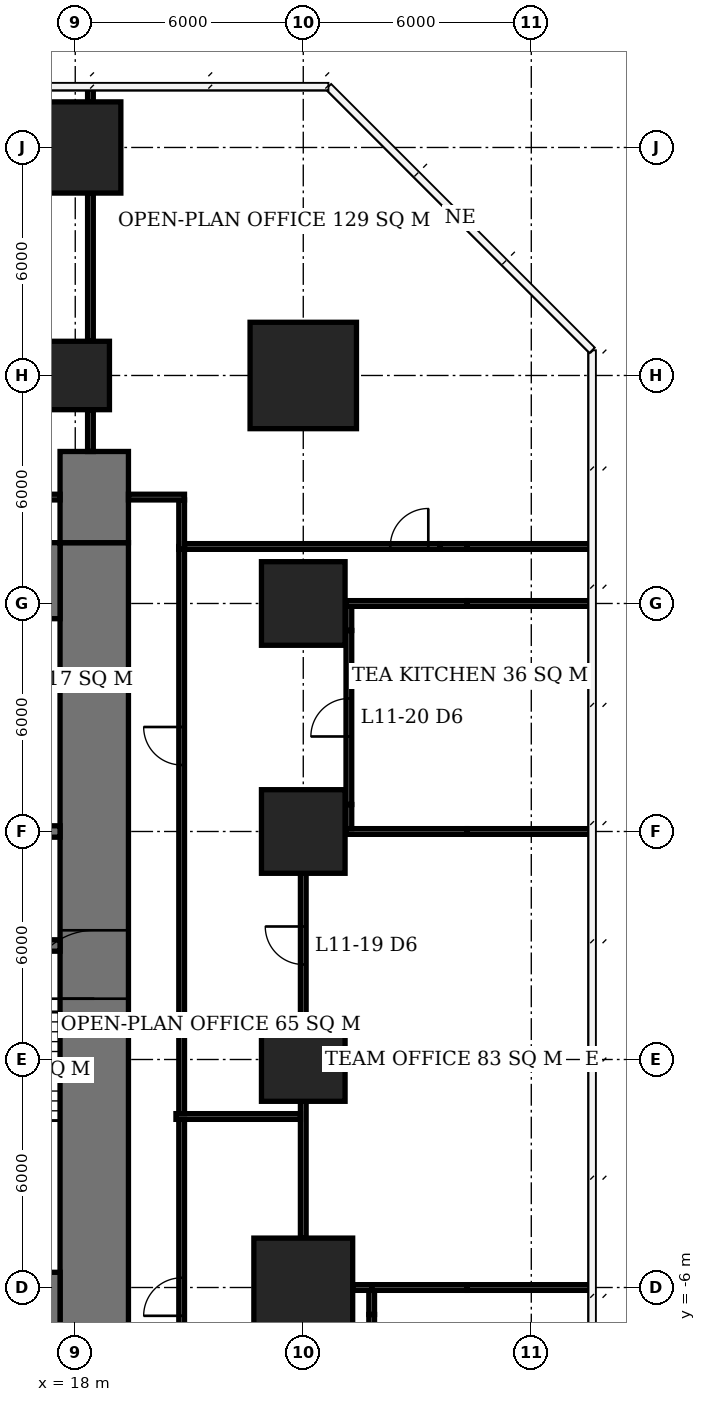
"""IFC4 building model, lengths in metres.
Left out: names, types, materials, properties, quantities, classifications, styles, units other than length and angle.
Written with IfcOpenShell. Run it as: python <this file> out.ifc"""

import sys

from ifc_helpers import new_model, si_unit, direction, frame, frame_2d, origin, origin_2d, place, context, subcontext, project, spatial, rectangle, extrude, element, fill, save


model = new_model("IFC4")
c1 = context("Model", 3, precision=1e-05, world=origin(), true_north=direction((0.0, 1.0)))
c2 = subcontext(c1, "Body", "Model", "MODEL_VIEW")
j1 = project(units=[si_unit("LENGTHUNIT", "METRE"), si_unit("PLANEANGLEUNIT", "RADIAN")], contexts=[c1])
p1 = place(None, origin())
s1 = spatial("IfcSite", under=j1, at=p1, CompositionType="ELEMENT")
p2 = place(p1, origin())
s2 = spatial("IfcBuilding", under=s1, at=p2, CompositionType="ELEMENT")
p3 = place(p2, frame((0.0, 0.0, 49.4)))
s3 = spatial("IfcBuildingStorey", under=s2, at=p3, CompositionType="ELEMENT", Elevation=49.4)
p4 = place(p3, frame((18.0, 18.0, 0.0), z_axis=(0.0, 0.0, 1.0), x_axis=(1.0, 0.0, 0.0)))
e1 = element("IfcColumn", 1, at=p4, inside=s3, PredefinedType="COLUMN", context=c2, shape_type="SweptSolid", body=[
    extrude(rectangle(XDim=1.8, YDim=1.8, at=origin_2d()), origin(), (0.0, 0.0, 1.0), 3.9),
])
p5 = place(p3, frame((18.0, 24.0, 0.0), z_axis=(0.0, 0.0, 1.0), x_axis=(1.0, 0.0, 0.0)))
e2 = element("IfcColumn", 2, at=p5, inside=s3, PredefinedType="COLUMN", context=c2, shape_type="SweptSolid", body=[
    extrude(rectangle(XDim=2.4, YDim=2.4, at=origin_2d()), origin(), (0.0, 0.0, 1.0), 3.9),
])
p6 = place(p3, frame((24.0, -6.0, 0.0), z_axis=(0.0, 0.0, 1.0), x_axis=(1.0, 0.0, 0.0)))
e3 = element("IfcColumn", 3, at=p6, inside=s3, PredefinedType="COLUMN", context=c2, shape_type="SweptSolid", body=[
    extrude(rectangle(XDim=2.6, YDim=2.6, at=origin_2d()), origin(), (0.0, 0.0, 1.0), 3.9),
])
for number, where, z_axis, x_axis in (
    (4, (24.0, 0.0, 0.0), (0.0, 0.0, 1.0), (1.0, 0.0, 0.0)),
    (5, (24.0, 6.0, 0.0), (0.0, 0.0, 1.0), (1.0, 0.0, 0.0)),
    (6, (24.0, 12.0, 0.0), (0.0, 0.0, 1.0), (1.0, 0.0, 0.0)),
):
    element("IfcColumn", number, at=place(p3, frame(where, z_axis=z_axis, x_axis=x_axis)), inside=s3, PredefinedType="COLUMN", context=c2, shape_type="SweptSolid", body=[
        extrude(rectangle(XDim=2.2, YDim=2.2, at=origin_2d()), origin(), (0.0, 0.0, 1.0), 3.9),
    ])
p7 = place(p3, frame((24.0, 18.0, 0.0), z_axis=(0.0, 0.0, 1.0), x_axis=(1.0, 0.0, 0.0)))
e7 = element("IfcColumn", 7, at=p7, inside=s3, PredefinedType="COLUMN", context=c2, shape_type="SweptSolid", body=[
    extrude(rectangle(XDim=2.8, YDim=2.8, at=origin_2d()), origin(), (0.0, 0.0, 1.0), 3.9),
])
for number, where, z_axis, x_axis in (
    (8, (-5.6, -6.6, 0.0), (0.0, 0.0, 1.0), (1.0, 0.0, 0.0)),
    (9, (-5.6, 12.6, 0.0), (0.0, 0.0, 1.0), (1.0, 0.0, 0.0)),
):
    element("IfcWall", number, at=place(p3, frame(where, z_axis=z_axis, x_axis=x_axis)), inside=s3, PredefinedType="SHEAR", context=c2, shape_type="SweptSolid", body=[
        extrude(rectangle(XDim=23.2, YDim=2.0, at=frame_2d((11.6, 0.0))), origin(), (0.0, 0.0, 1.0), 3.9),
    ])
p8 = place(p3, frame((18.5, -7.6, 0.0), z_axis=(0.0, 0.0, 1.0), x_axis=(0.0, 1.0, 0.0)))
e10 = element("IfcWall", 10, at=p8, inside=s3, PredefinedType="SHEAR", context=c2, shape_type="SweptSolid", body=[
    extrude(rectangle(XDim=21.2, YDim=1.8, at=frame_2d((10.6, 0.0))), origin(), (0.0, 0.0, 1.0), 3.9),
])
p9 = place(p8, frame((9.2, 0.0, 0.0)))
e11 = element("IfcOpeningElement", 11, at=p9, cuts=e10, PredefinedType="OPENING", context=c2, shape_type="SweptSolid", body=[
    extrude(rectangle(XDim=1.8, YDim=2.4, at=frame_2d((0.9, 1.2))), frame((0.0, 0.91, 0.0), z_axis=(0.0, -1.0, 0.0), x_axis=(1.0, 0.0, 0.0)), (0.0, 0.0, 1.0), 1.82),
])
p10 = place(p3, frame((18.5, 13.6, 0.0), z_axis=(0.0, 0.0, 1.0), x_axis=(0.0, 1.0, 0.0)))
e12 = element("IfcWall", 12, at=p10, inside=s3, PredefinedType="SHEAR", context=c2, shape_type="SweptSolid", body=[
    extrude(rectangle(XDim=2.4, YDim=1.8, at=frame_2d((1.2, 0.0))), origin(), (0.0, 0.0, 1.0), 3.9),
])
p11 = place(p3, frame((12.15, 3.0, 0.0), z_axis=(0.0, 0.0, 1.0), x_axis=(1.0, 0.0, 0.0)))
e13 = element("IfcWall", 13, at=p11, inside=s3, PredefinedType="SHEAR", context=c2, shape_type="SweptSolid", body=[
    extrude(rectangle(XDim=5.45, YDim=0.3, at=frame_2d((2.725, 0.0))), origin(), (0.0, 0.0, 1.0), 3.9),
])
p12 = place(p11, frame((3.25, 0.0, 0.0)))
e14 = element("IfcOpeningElement", 14, at=p12, cuts=e13, PredefinedType="OPENING", context=c2, shape_type="SweptSolid", body=[
    extrude(rectangle(XDim=1.2, YDim=2.1, at=frame_2d((0.6, 1.05))), frame((0.0, 0.16, 0.0), z_axis=(0.0, -1.0, 0.0), x_axis=(1.0, 0.0, 0.0)), (0.0, 0.0, 1.0), 0.32),
])
p13 = place(p11, frame((0.45, 0.0, 0.0)))
e15 = element("IfcOpeningElement", 15, at=p13, cuts=e13, PredefinedType="OPENING", context=c2, shape_type="SweptSolid", body=[
    extrude(rectangle(XDim=0.9, YDim=2.1, at=frame_2d((0.45, 1.05))), frame((0.0, 0.16, 0.0), z_axis=(0.0, -1.0, 0.0), x_axis=(1.0, 0.0, 0.0)), (0.0, 0.0, 1.0), 0.32),
])
p14 = place(p3, frame((-0.15, 6.0, 0.0), z_axis=(0.0, 0.0, 1.0), x_axis=(1.0, 0.0, 0.0)))
e16 = element("IfcWall", 16, at=p14, inside=s3, PredefinedType="SHEAR", context=c2, shape_type="SweptSolid", body=[
    extrude(rectangle(XDim=17.75, YDim=0.3, at=frame_2d((8.875, 0.0))), origin(), (0.0, 0.0, 1.0), 3.9),
])
p15 = place(p14, frame((13.15, 0.0, 0.0)))
e17 = element("IfcOpeningElement", 17, at=p15, cuts=e16, PredefinedType="OPENING", context=c2, shape_type="SweptSolid", body=[
    extrude(rectangle(XDim=0.9, YDim=2.1, at=frame_2d((0.45, 1.05))), frame((0.0, 0.16, 0.0), z_axis=(0.0, -1.0, 0.0), x_axis=(1.0, 0.0, 0.0)), (0.0, 0.0, 1.0), 0.32),
])
p16 = place(p14, frame((16.25, 0.0, 0.0)))
e18 = element("IfcOpeningElement", 18, at=p16, cuts=e16, PredefinedType="OPENING", context=c2, shape_type="SweptSolid", body=[
    extrude(rectangle(XDim=1.0, YDim=2.1, at=frame_2d((0.5, 1.05))), frame((0.0, 0.16, 0.0), z_axis=(0.0, -1.0, 0.0), x_axis=(1.0, 0.0, 0.0)), (0.0, 0.0, 1.0), 0.32),
])
p17 = place(p14, frame((1.1, 0.0, 0.0)))
e19 = element("IfcOpeningElement", 19, at=p17, cuts=e16, PredefinedType="OPENING", context=c2, shape_type="SweptSolid", body=[
    extrude(rectangle(XDim=1.1, YDim=2.1, at=frame_2d((0.55, 1.05))), frame((0.0, 0.16, 0.0), z_axis=(0.0, -1.0, 0.0), x_axis=(1.0, 0.0, 0.0)), (0.0, 0.0, 1.0), 0.32),
])
p18 = place(p14, frame((4.1, 0.0, 0.0)))
e20 = element("IfcOpeningElement", 20, at=p18, cuts=e16, PredefinedType="OPENING", context=c2, shape_type="SweptSolid", body=[
    extrude(rectangle(XDim=1.1, YDim=2.1, at=frame_2d((0.55, 1.05))), frame((0.0, 0.16, 0.0), z_axis=(0.0, -1.0, 0.0), x_axis=(1.0, 0.0, 0.0)), (0.0, 0.0, 1.0), 0.32),
])
p19 = place(p14, frame((7.1, 0.0, 0.0)))
e21 = element("IfcOpeningElement", 21, at=p19, cuts=e16, PredefinedType="OPENING", context=c2, shape_type="SweptSolid", body=[
    extrude(rectangle(XDim=1.1, YDim=2.1, at=frame_2d((0.55, 1.05))), frame((0.0, 0.16, 0.0), z_axis=(0.0, -1.0, 0.0), x_axis=(1.0, 0.0, 0.0)), (0.0, 0.0, 1.0), 0.32),
])
p20 = place(p14, frame((10.1, 0.0, 0.0)))
e22 = element("IfcOpeningElement", 22, at=p20, cuts=e16, PredefinedType="OPENING", context=c2, shape_type="SweptSolid", body=[
    extrude(rectangle(XDim=1.1, YDim=2.1, at=frame_2d((0.55, 1.05))), frame((0.0, 0.16, 0.0), z_axis=(0.0, -1.0, 0.0), x_axis=(1.0, 0.0, 0.0)), (0.0, 0.0, 1.0), 0.32),
])
p21 = place(p3, frame((25.3, -6.0, 0.0), z_axis=(0.0, 0.0, 1.0), x_axis=(1.0, 0.0, 0.0)))
e23 = element("IfcWall", 23, at=p21, inside=s3, PredefinedType="PARTITIONING", context=c2, shape_type="SweptSolid", body=[
    extrude(rectangle(XDim=0.575, YDim=0.15, at=frame_2d((0.288, 0.0))), origin(), (0.0, 0.0, 1.0), 2.65),
])
p22 = place(p3, frame((25.8, -6.0, 0.0), z_axis=(0.0, 0.0, 1.0), x_axis=(1.0, 0.0, 0.0)))
e24 = element("IfcWall", 24, at=p22, inside=s3, PredefinedType="PARTITIONING", context=c2, shape_type="SweptSolid", body=[
    extrude(rectangle(XDim=2.51, YDim=0.15, at=frame_2d((1.255, 0.0))), origin(), (0.0, 0.0, 1.0), 2.65),
])
p23 = place(p3, frame((28.31, -6.0, 0.0), z_axis=(0.0, 0.0, 1.0), x_axis=(1.0, 0.0, 0.0)))
e25 = element("IfcWall", 25, at=p23, inside=s3, PredefinedType="PARTITIONING", context=c2, shape_type="SweptSolid", body=[
    extrude(rectangle(XDim=3.29, YDim=0.15, at=frame_2d((1.645, 0.0))), origin(), (0.0, 0.0, 1.0), 3.65),
])
p24 = place(p3, frame((25.125, 6.0, 0.0), z_axis=(0.0, 0.0, 1.0), x_axis=(1.0, 0.0, 0.0)))
e26 = element("IfcWall", 26, at=p24, inside=s3, PredefinedType="PARTITIONING", context=c2, shape_type="SweptSolid", body=[
    extrude(rectangle(XDim=3.185, YDim=0.15, at=frame_2d((1.593, 0.0))), origin(), (0.0, 0.0, 1.0), 2.65),
])
p25 = place(p3, frame((28.31, 6.0, 0.0), z_axis=(0.0, 0.0, 1.0), x_axis=(1.0, 0.0, 0.0)))
e27 = element("IfcWall", 27, at=p25, inside=s3, PredefinedType="PARTITIONING", context=c2, shape_type="SweptSolid", body=[
    extrude(rectangle(XDim=3.29, YDim=0.15, at=frame_2d((1.645, 0.0))), origin(), (0.0, 0.0, 1.0), 3.65),
])
p26 = place(p3, frame((25.125, 12.0, 0.0), z_axis=(0.0, 0.0, 1.0), x_axis=(1.0, 0.0, 0.0)))
e28 = element("IfcWall", 28, at=p26, inside=s3, PredefinedType="PARTITIONING", context=c2, shape_type="SweptSolid", body=[
    extrude(rectangle(XDim=3.185, YDim=0.15, at=frame_2d((1.593, 0.0))), origin(), (0.0, 0.0, 1.0), 2.65),
])
p27 = place(p3, frame((28.31, 12.0, 0.0), z_axis=(0.0, 0.0, 1.0), x_axis=(1.0, 0.0, 0.0)))
e29 = element("IfcWall", 29, at=p27, inside=s3, PredefinedType="PARTITIONING", context=c2, shape_type="SweptSolid", body=[
    extrude(rectangle(XDim=3.29, YDim=0.15, at=frame_2d((1.645, 0.0))), origin(), (0.0, 0.0, 1.0), 3.65),
])
p28 = place(p3, frame((24.0, -4.7, 0.0), z_axis=(0.0, 0.0, 1.0), x_axis=(0.0, 1.0, 0.0)))
e30 = element("IfcWall", 30, at=p28, inside=s3, PredefinedType="PARTITIONING", context=c2, shape_type="SweptSolid", body=[
    extrude(rectangle(XDim=3.6, YDim=0.15, at=frame_2d((1.8, 0.0))), origin(), (0.0, 0.0, 1.0), 3.65),
])
p29 = place(p3, frame((24.0, 1.1, 0.0), z_axis=(0.0, 0.0, 1.0), x_axis=(0.0, 1.0, 0.0)))
e31 = element("IfcWall", 31, at=p29, inside=s3, PredefinedType="PARTITIONING", context=c2, shape_type="SweptSolid", body=[
    extrude(rectangle(XDim=3.8, YDim=0.15, at=frame_2d((1.9, 0.0))), origin(), (0.0, 0.0, 1.0), 3.65),
])
p30 = place(p29, frame((1.4, 0.0, 0.0)))
e32 = element("IfcOpeningElement", 32, at=p30, cuts=e31, PredefinedType="OPENING", context=c2, shape_type="SweptSolid", body=[
    extrude(rectangle(XDim=1.0, YDim=2.1, at=frame_2d((0.5, 1.05))), frame((0.0, 0.085, 0.0), z_axis=(0.0, -1.0, 0.0), x_axis=(1.0, 0.0, 0.0)), (0.0, 0.0, 1.0), 0.17),
])
p31 = place(p3, frame((25.2, 6.075, 0.0), z_axis=(0.0, 0.0, 1.0), x_axis=(0.0, 1.0, 0.0)))
e33 = element("IfcWall", 33, at=p31, inside=s3, PredefinedType="PARTITIONING", context=c2, shape_type="SweptSolid", body=[
    extrude(rectangle(XDim=0.635, YDim=0.15, at=frame_2d((0.317, 0.0))), origin(), (0.0, 0.0, 1.0), 2.65),
])
p32 = place(p3, frame((25.2, 6.71, 0.0), z_axis=(0.0, 0.0, 1.0), x_axis=(0.0, 1.0, 0.0)))
e34 = element("IfcWall", 34, at=p32, inside=s3, PredefinedType="PARTITIONING", context=c2, shape_type="SweptSolid", body=[
    extrude(rectangle(XDim=4.58, YDim=0.15, at=frame_2d((2.29, 0.0))), origin(), (0.0, 0.0, 1.0), 3.65),
])
p33 = place(p32, frame((1.79, 0.0, 0.0)))
e35 = element("IfcOpeningElement", 35, at=p33, cuts=e34, PredefinedType="OPENING", context=c2, shape_type="SweptSolid", body=[
    extrude(rectangle(XDim=1.0, YDim=2.1, at=frame_2d((0.5, 1.05))), frame((0.0, 0.085, 0.0), z_axis=(0.0, -1.0, 0.0), x_axis=(1.0, 0.0, 0.0)), (0.0, 0.0, 1.0), 0.17),
])
p34 = place(p3, frame((25.2, 11.29, 0.0), z_axis=(0.0, 0.0, 1.0), x_axis=(0.0, 1.0, 0.0)))
e36 = element("IfcWall", 36, at=p34, inside=s3, PredefinedType="PARTITIONING", context=c2, shape_type="SweptSolid", body=[
    extrude(rectangle(XDim=0.635, YDim=0.15, at=frame_2d((0.317, 0.0))), origin(), (0.0, 0.0, 1.0), 2.65),
])
p35 = place(p3, frame((25.8, -11.29, 0.0), z_axis=(0.0, 0.0, 1.0), x_axis=(0.0, 1.0, 0.0)))
e37 = element("IfcWall", 37, at=p35, inside=s3, PredefinedType="PARTITIONING", context=c2, shape_type="SweptSolid", body=[
    extrude(rectangle(XDim=4.58, YDim=0.15, at=frame_2d((2.29, 0.0))), origin(), (0.0, 0.0, 1.0), 3.65),
])
p36 = place(p35, frame((1.79, 0.0, 0.0)))
e38 = element("IfcOpeningElement", 38, at=p36, cuts=e37, PredefinedType="OPENING", context=c2, shape_type="SweptSolid", body=[
    extrude(rectangle(XDim=1.0, YDim=2.1, at=frame_2d((0.5, 1.05))), frame((0.0, 0.085, 0.0), z_axis=(0.0, -1.0, 0.0), x_axis=(1.0, 0.0, 0.0)), (0.0, 0.0, 1.0), 0.17),
])
p37 = place(p3, frame((25.8, -6.71, 0.0), z_axis=(0.0, 0.0, 1.0), x_axis=(0.0, 1.0, 0.0)))
e39 = element("IfcWall", 39, at=p37, inside=s3, PredefinedType="PARTITIONING", context=c2, shape_type="SweptSolid", body=[
    extrude(rectangle(XDim=0.635, YDim=0.15, at=frame_2d((0.317, 0.0))), origin(), (0.0, 0.0, 1.0), 2.65),
])
p38 = place(p3, frame((7.575, 14.8, 0.0), z_axis=(0.0, 0.0, 1.0), x_axis=(1.0, 0.0, 0.0)))
e40 = element("IfcWall", 40, at=p38, inside=s3, PredefinedType="PARTITIONING", context=c2, shape_type="SweptSolid", body=[
    extrude(rectangle(XDim=10.025, YDim=0.15, at=frame_2d((5.013, 0.0))), origin(), (0.0, 0.0, 1.0), 3.65),
])
p39 = place(p38, frame((5.99, 0.0, 0.0)))
e41 = element("IfcOpeningElement", 41, at=p39, cuts=e40, PredefinedType="OPENING", context=c2, shape_type="SweptSolid", body=[
    extrude(rectangle(XDim=1.0, YDim=2.1, at=frame_2d((0.5, 1.05))), frame((0.0, 0.085, 0.0), z_axis=(0.0, -1.0, 0.0), x_axis=(1.0, 0.0, 0.0)), (0.0, 0.0, 1.0), 0.17),
])
p40 = place(p3, frame((18.4, 16.0, 0.0), z_axis=(0.0, 0.0, 1.0), x_axis=(0.0, 1.0, 0.0)))
e42 = element("IfcWall", 42, at=p40, inside=s3, PredefinedType="PARTITIONING", context=c2, shape_type="SweptSolid", body=[
    extrude(rectangle(XDim=1.1, YDim=0.15, at=frame_2d((0.55, 0.0))), origin(), (0.0, 0.0, 1.0), 3.65),
])
p41 = place(p3, frame((18.4, 18.9, 0.0), z_axis=(0.0, 0.0, 1.0), x_axis=(0.0, 1.0, 0.0)))
e43 = element("IfcWall", 43, at=p41, inside=s3, PredefinedType="PARTITIONING", context=c2, shape_type="SweptSolid", body=[
    extrude(rectangle(XDim=3.9, YDim=0.15, at=frame_2d((1.95, 0.0))), origin(), (0.0, 0.0, 1.0), 3.65),
])
p42 = place(p3, frame((18.4, 25.2, 0.0), z_axis=(0.0, 0.0, 1.0), x_axis=(0.0, 1.0, 0.0)))
e44 = element("IfcWall", 44, at=p42, inside=s3, PredefinedType="PARTITIONING", context=c2, shape_type="SweptSolid", body=[
    extrude(rectangle(XDim=0.35, YDim=0.15, at=frame_2d((0.175, 0.0))), origin(), (0.0, 0.0, 1.0), 3.65),
])
p43 = place(p3, frame((19.4, 14.8, 0.0), z_axis=(0.0, 0.0, 1.0), x_axis=(1.0, 0.0, 0.0)))
e45 = element("IfcWall", 45, at=p43, inside=s3, PredefinedType="PARTITIONING", context=c2, shape_type="SweptSolid", body=[
    extrude(rectangle(XDim=1.475, YDim=0.15, at=frame_2d((0.738, 0.0))), origin(), (0.0, 0.0, 1.0), 3.65),
])
p44 = place(p3, frame((20.8, -8.725, 0.0), z_axis=(0.0, 0.0, 1.0), x_axis=(0.0, 1.0, 0.0)))
e46 = element("IfcWall", 46, at=p44, inside=s3, PredefinedType="PARTITIONING", context=c2, shape_type="SweptSolid", body=[
    extrude(rectangle(XDim=7.15, YDim=0.15, at=frame_2d((3.575, 0.0))), origin(), (0.0, 0.0, 1.0), 3.65),
])
p45 = place(p44, frame((1.98, 0.0, 0.0)))
e47 = element("IfcOpeningElement", 47, at=p45, cuts=e46, PredefinedType="OPENING", context=c2, shape_type="SweptSolid", body=[
    extrude(rectangle(XDim=1.0, YDim=2.1, at=frame_2d((0.5, 1.05))), frame((0.0, 0.085, 0.0), z_axis=(0.0, -1.0, 0.0), x_axis=(1.0, 0.0, 0.0)), (0.0, 0.0, 1.0), 0.17),
])
p46 = place(p3, frame((20.8, -1.425, 0.0), z_axis=(0.0, 0.0, 1.0), x_axis=(0.0, 1.0, 0.0)))
e48 = element("IfcWall", 48, at=p46, inside=s3, PredefinedType="PARTITIONING", context=c2, shape_type="SweptSolid", body=[
    extrude(rectangle(XDim=14.925, YDim=0.15, at=frame_2d((7.462, 0.0))), origin(), (0.0, 0.0, 1.0), 3.65),
])
p47 = place(p46, frame((9.175, 0.0, 0.0)))
e49 = element("IfcOpeningElement", 49, at=p47, cuts=e48, PredefinedType="OPENING", context=c2, shape_type="SweptSolid", body=[
    extrude(rectangle(XDim=1.0, YDim=2.1, at=frame_2d((0.5, 1.05))), frame((0.0, 0.085, 0.0), z_axis=(0.0, -1.0, 0.0), x_axis=(1.0, 0.0, 0.0)), (0.0, 0.0, 1.0), 0.17),
])
p48 = place(p3, frame((20.65, -1.5, 0.0), z_axis=(0.0, 0.0, 1.0), x_axis=(1.0, 0.0, 0.0)))
e50 = element("IfcWall", 50, at=p48, inside=s3, PredefinedType="PARTITIONING", context=c2, shape_type="SweptSolid", body=[
    extrude(rectangle(XDim=3.275, YDim=0.15, at=frame_2d((1.638, 0.0))), origin(), (0.0, 0.0, 1.0), 3.65),
])
p49 = place(p3, frame((20.8, 13.425, 0.0), z_axis=(0.0, 0.0, 1.0), x_axis=(0.0, 1.0, 0.0)))
e51 = element("IfcWall", 51, at=p49, inside=s3, PredefinedType="PARTITIONING", context=c2, shape_type="SweptSolid", body=[
    extrude(rectangle(XDim=1.3, YDim=0.15, at=frame_2d((0.65, 0.0))), origin(), (0.0, 0.0, 1.0), 3.65),
])
p50 = place(p3, frame((20.875, 13.5, 0.0), z_axis=(0.0, 0.0, 1.0), x_axis=(1.0, 0.0, 0.0)))
e52 = element("IfcWall", 52, at=p50, inside=s3, PredefinedType="PARTITIONING", context=c2, shape_type="SweptSolid", body=[
    extrude(rectangle(XDim=6.715, YDim=0.15, at=frame_2d((3.357, 0.0))), origin(), (0.0, 0.0, 1.0), 3.65),
])
p51 = place(p50, frame((5.415, 0.0, 0.0)))
e53 = element("IfcOpeningElement", 53, at=p51, cuts=e52, PredefinedType="OPENING", context=c2, shape_type="SweptSolid", body=[
    extrude(rectangle(XDim=1.0, YDim=2.1, at=frame_2d((0.5, 1.05))), frame((0.0, 0.085, 0.0), z_axis=(0.0, -1.0, 0.0), x_axis=(1.0, 0.0, 0.0)), (0.0, 0.0, 1.0), 0.17),
])
p52 = place(p3, frame((27.59, 13.5, 0.0), z_axis=(0.0, 0.0, 1.0), x_axis=(1.0, 0.0, 0.0)))
e54 = element("IfcWall", 54, at=p52, inside=s3, PredefinedType="PARTITIONING", context=c2, shape_type="SweptSolid", body=[
    extrude(rectangle(XDim=0.72, YDim=0.15, at=frame_2d((0.36, 0.0))), origin(), (0.0, 0.0, 1.0), 2.65),
])
p53 = place(p3, frame((28.31, 13.5, 0.0), z_axis=(0.0, 0.0, 1.0), x_axis=(1.0, 0.0, 0.0)))
e55 = element("IfcWall", 55, at=p53, inside=s3, PredefinedType="PARTITIONING", context=c2, shape_type="SweptSolid", body=[
    extrude(rectangle(XDim=3.29, YDim=0.15, at=frame_2d((1.645, 0.0))), origin(), (0.0, 0.0, 1.0), 3.65),
])
p54 = place(p9, origin())
e56 = element("IfcDoor", 56, at=p54, inside=s3, OperationType="DOUBLE_DOOR_SINGLE_SWING", PredefinedType="DOOR", context=c2, shape_type="SweptSolid", body=[
    extrude(rectangle(XDim=1.8, YDim=2.4, at=frame_2d((0.9, 1.2))), frame((0.0, 0.025, 0.0), z_axis=(0.0, -1.0, 0.0), x_axis=(1.0, 0.0, 0.0)), (0.0, 0.0, 1.0), 0.05),
])
fill(e11, e56)
p55 = place(p30, origin())
e57 = element("IfcDoor", 57, at=p55, inside=s3, OperationType="SINGLE_SWING_RIGHT", PredefinedType="DOOR", context=c2, shape_type="SweptSolid", body=[
    extrude(rectangle(XDim=1.0, YDim=2.1, at=frame_2d((0.5, 1.05))), frame((0.0, 0.025, 0.0), z_axis=(0.0, -1.0, 0.0), x_axis=(1.0, 0.0, 0.0)), (0.0, 0.0, 1.0), 0.05),
])
fill(e32, e57)
p56 = place(p33, origin())
e58 = element("IfcDoor", 58, at=p56, inside=s3, OperationType="SINGLE_SWING_LEFT", PredefinedType="DOOR", context=c2, shape_type="SweptSolid", body=[
    extrude(rectangle(XDim=1.0, YDim=2.1, at=frame_2d((0.5, 1.05))), frame((0.0, 0.025, 0.0), z_axis=(0.0, -1.0, 0.0), x_axis=(1.0, 0.0, 0.0)), (0.0, 0.0, 1.0), 0.05),
])
fill(e35, e58)
p57 = place(p45, origin())
e59 = element("IfcDoor", 59, at=p57, inside=s3, OperationType="SINGLE_SWING_LEFT", PredefinedType="DOOR", context=c2, shape_type="SweptSolid", body=[
    extrude(rectangle(XDim=1.0, YDim=2.1, at=frame_2d((0.5, 1.05))), frame((0.0, 0.025, 0.0), z_axis=(0.0, -1.0, 0.0), x_axis=(1.0, 0.0, 0.0)), (0.0, 0.0, 1.0), 0.05),
])
fill(e47, e59)
p58 = place(p47, origin())
e60 = element("IfcDoor", 60, at=p58, inside=s3, OperationType="SINGLE_SWING_RIGHT", PredefinedType="DOOR", context=c2, shape_type="SweptSolid", body=[
    extrude(rectangle(XDim=1.0, YDim=2.1, at=frame_2d((0.5, 1.05))), frame((0.0, 0.025, 0.0), z_axis=(0.0, -1.0, 0.0), x_axis=(1.0, 0.0, 0.0)), (0.0, 0.0, 1.0), 0.05),
])
fill(e49, e60)
p59 = place(p51, origin())
e61 = element("IfcDoor", 61, at=p59, inside=s3, OperationType="SINGLE_SWING_RIGHT", PredefinedType="DOOR", context=c2, shape_type="SweptSolid", body=[
    extrude(rectangle(XDim=1.0, YDim=2.1, at=frame_2d((0.5, 1.05))), frame((0.0, 0.025, 0.0), z_axis=(0.0, -1.0, 0.0), x_axis=(1.0, 0.0, 0.0)), (0.0, 0.0, 1.0), 0.05),
])
fill(e53, e61)
save(model, sys.argv[1])
